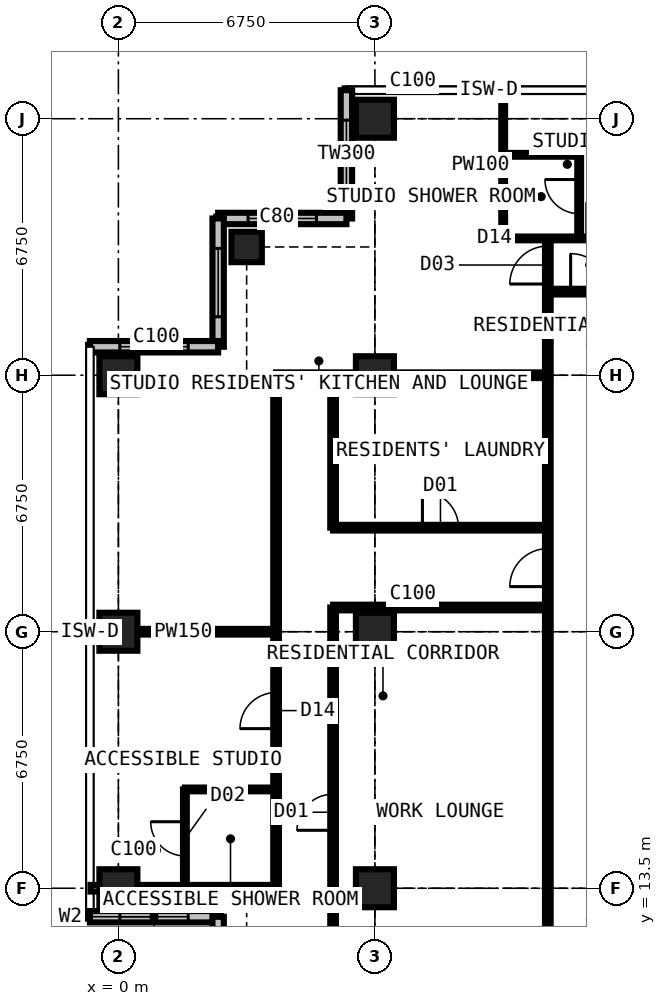
"""IFC4 building model, lengths in metres.
Left out: names, types, materials, properties, quantities, classifications, styles, units other than length and angle.
Written with IfcOpenShell. Run it as: python <this file> out.ifc"""

import sys

from ifc_helpers import new_model, si_unit, direction, frame, frame_2d, origin, origin_2d, place, context, subcontext, project, spatial, rectangle, extrude, element, fill, save


model = new_model("IFC4")
c1 = context("Model", 3, precision=1e-05, world=origin(), true_north=direction((0.0, 1.0)))
c2 = subcontext(c1, "Body", "Model", "MODEL_VIEW")
j1 = project(units=[si_unit("LENGTHUNIT", "METRE"), si_unit("PLANEANGLEUNIT", "RADIAN")], contexts=[c1])
p1 = place(None, origin())
s1 = spatial("IfcSite", under=j1, at=p1, CompositionType="ELEMENT")
p2 = place(p1, origin())
s2 = spatial("IfcBuilding", under=s1, at=p2, CompositionType="ELEMENT")
p3 = place(p2, frame((0.0, 0.0, 233.1)))
s3 = spatial("IfcBuildingStorey", under=s2, at=p3, CompositionType="ELEMENT", Elevation=233.1)
for number, where, z_axis, x_axis in (
    (1, (0.0, 13.5, 0.0), (0.0, 0.0, 1.0), (1.0, 0.0, 0.0)),
    (2, (0.0, 20.25, 0.0), (0.0, 0.0, 1.0), (1.0, 0.0, 0.0)),
    (3, (0.0, 27.0, 0.0), (0.0, 0.0, 1.0), (1.0, 0.0, 0.0)),
):
    element("IfcColumn", number, at=place(p3, frame(where, z_axis=z_axis, x_axis=x_axis)), inside=s3, PredefinedType="COLUMN", context=c2, shape_type="SweptSolid", body=[
        extrude(rectangle(XDim=1.0, YDim=1.0, at=origin_2d()), origin(), (0.0, 0.0, 1.0), 3.6),
    ])
p4 = place(p3, frame((3.375, 30.375, 0.0), z_axis=(0.0, 0.0, 1.0), x_axis=(1.0, 0.0, 0.0)))
e4 = element("IfcColumn", 4, at=p4, inside=s3, PredefinedType="COLUMN", context=c2, shape_type="SweptSolid", body=[
    extrude(rectangle(XDim=0.8, YDim=0.8, at=origin_2d()), origin(), (0.0, 0.0, 1.0), 3.6),
])
for number, where, z_axis, x_axis in (
    (5, (6.75, 13.5, 0.0), (0.0, 0.0, 1.0), (1.0, 0.0, 0.0)),
    (6, (6.75, 20.25, 0.0), (0.0, 0.0, 1.0), (1.0, 0.0, 0.0)),
    (7, (6.75, 27.0, 0.0), (0.0, 0.0, 1.0), (1.0, 0.0, 0.0)),
    (8, (6.75, 33.75, 0.0), (0.0, 0.0, 1.0), (1.0, 0.0, 0.0)),
):
    element("IfcColumn", number, at=place(p3, frame(where, z_axis=z_axis, x_axis=x_axis)), inside=s3, PredefinedType="COLUMN", context=c2, shape_type="SweptSolid", body=[
        extrude(rectangle(XDim=1.0, YDim=1.0, at=origin_2d()), origin(), (0.0, 0.0, 1.0), 3.6),
    ])
p5 = place(p3, frame((6.0, 34.5, 0.0), z_axis=(0.0, 0.0, 1.0), x_axis=(0.0, -1.0, 0.0)))
e9 = element("IfcWall", 9, at=p5, inside=s3, PredefinedType="SOLIDWALL", context=c2, shape_type="SweptSolid", body=[
    extrude(rectangle(XDim=3.375, YDim=0.3, at=frame_2d((1.688, 0.0))), origin(), (0.0, 0.0, 1.0), 3.375),
])
p6 = place(p5, frame((0.788, 0.0, 0.6)))
e10 = element("IfcOpeningElement", 10, at=p6, cuts=e9, PredefinedType="OPENING", context=c2, shape_type="SweptSolid", body=[
    extrude(rectangle(XDim=1.8, YDim=2.1, at=frame_2d((0.9, 1.05))), frame((0.0, 0.16, 0.0), z_axis=(0.0, -1.0, 0.0), x_axis=(1.0, 0.0, 0.0)), (0.0, 0.0, 1.0), 0.32),
])
p7 = place(p3, frame((6.0, 31.125, 0.0), z_axis=(0.0, 0.0, 1.0), x_axis=(-1.0, 0.0, 0.0)))
e11 = element("IfcWall", 11, at=p7, inside=s3, PredefinedType="SOLIDWALL", context=c2, shape_type="SweptSolid", body=[
    extrude(rectangle(XDim=3.375, YDim=0.3, at=frame_2d((1.688, 0.0))), origin(), (0.0, 0.0, 1.0), 3.375),
])
p8 = place(p7, frame((0.788, 0.0, 0.6)))
e12 = element("IfcOpeningElement", 12, at=p8, cuts=e11, PredefinedType="OPENING", context=c2, shape_type="SweptSolid", body=[
    extrude(rectangle(XDim=1.8, YDim=2.1, at=frame_2d((0.9, 1.05))), frame((0.0, 0.16, 0.0), z_axis=(0.0, -1.0, 0.0), x_axis=(1.0, 0.0, 0.0)), (0.0, 0.0, 1.0), 0.32),
])
p9 = place(p3, frame((2.625, 31.125, 0.0), z_axis=(0.0, 0.0, 1.0), x_axis=(0.0, -1.0, 0.0)))
e13 = element("IfcWall", 13, at=p9, inside=s3, PredefinedType="SOLIDWALL", context=c2, shape_type="SweptSolid", body=[
    extrude(rectangle(XDim=3.375, YDim=0.3, at=frame_2d((1.688, 0.0))), origin(), (0.0, 0.0, 1.0), 3.375),
])
p10 = place(p9, frame((0.788, 0.0, 0.6)))
e14 = element("IfcOpeningElement", 14, at=p10, cuts=e13, PredefinedType="OPENING", context=c2, shape_type="SweptSolid", body=[
    extrude(rectangle(XDim=1.8, YDim=2.1, at=frame_2d((0.9, 1.05))), frame((0.0, 0.16, 0.0), z_axis=(0.0, -1.0, 0.0), x_axis=(1.0, 0.0, 0.0)), (0.0, 0.0, 1.0), 0.32),
])
p11 = place(p3, frame((2.625, 27.75, 0.0), z_axis=(0.0, 0.0, 1.0), x_axis=(-1.0, 0.0, 0.0)))
e15 = element("IfcWall", 15, at=p11, inside=s3, PredefinedType="SOLIDWALL", context=c2, shape_type="SweptSolid", body=[
    extrude(rectangle(XDim=3.375, YDim=0.3, at=frame_2d((1.688, 0.0))), origin(), (0.0, 0.0, 1.0), 3.375),
])
p12 = place(p11, frame((0.788, 0.0, 0.6)))
e16 = element("IfcOpeningElement", 16, at=p12, cuts=e15, PredefinedType="OPENING", context=c2, shape_type="SweptSolid", body=[
    extrude(rectangle(XDim=1.8, YDim=2.1, at=frame_2d((0.9, 1.05))), frame((0.0, 0.16, 0.0), z_axis=(0.0, -1.0, 0.0), x_axis=(1.0, 0.0, 0.0)), (0.0, 0.0, 1.0), 0.32),
])
p13 = place(p3, frame((-0.75, 12.75, 0.0), z_axis=(0.0, 0.0, 1.0), x_axis=(1.0, 0.0, 0.0)))
e17 = element("IfcWall", 17, at=p13, inside=s3, PredefinedType="SOLIDWALL", context=c2, shape_type="SweptSolid", body=[
    extrude(rectangle(XDim=3.375, YDim=0.3, at=frame_2d((1.688, 0.0))), origin(), (0.0, 0.0, 1.0), 3.375),
])
p14 = place(p13, frame((0.788, 0.0, 0.6)))
e18 = element("IfcOpeningElement", 18, at=p14, cuts=e17, PredefinedType="OPENING", context=c2, shape_type="SweptSolid", body=[
    extrude(rectangle(XDim=1.8, YDim=2.1, at=frame_2d((0.9, 1.05))), frame((0.0, 0.16, 0.0), z_axis=(0.0, -1.0, 0.0), x_axis=(1.0, 0.0, 0.0)), (0.0, 0.0, 1.0), 0.32),
])
p15 = place(p3, frame((2.625, 12.75, 0.0), z_axis=(0.0, 0.0, 1.0), x_axis=(0.0, -1.0, 0.0)))
e19 = element("IfcWall", 19, at=p15, inside=s3, PredefinedType="SOLIDWALL", context=c2, shape_type="SweptSolid", body=[
    extrude(rectangle(XDim=3.375, YDim=0.3, at=frame_2d((1.688, 0.0))), origin(), (0.0, 0.0, 1.0), 3.375),
])
p16 = place(p15, frame((0.788, 0.0, 0.6)))
e20 = element("IfcOpeningElement", 20, at=p16, cuts=e19, PredefinedType="OPENING", context=c2, shape_type="SweptSolid", body=[
    extrude(rectangle(XDim=1.8, YDim=2.1, at=frame_2d((0.9, 1.05))), frame((0.0, 0.16, 0.0), z_axis=(0.0, -1.0, 0.0), x_axis=(1.0, 0.0, 0.0)), (0.0, 0.0, 1.0), 0.32),
])
p17 = place(p3, frame((-0.734, 13.5, 0.0), z_axis=(0.0, 0.0, 1.0), x_axis=(1.0, 0.0, 0.0)))
e21 = element("IfcWall", 21, at=p17, inside=s3, PredefinedType="PARTITIONING", context=c2, shape_type="SweptSolid", body=[
    extrude(rectangle(XDim=4.884, YDim=0.175, at=frame_2d((2.442, 0.0))), origin(), (0.0, 0.0, 1.0), 2.877),
])
p18 = place(p3, frame((-0.734, 20.25, 0.0), z_axis=(0.0, 0.0, 1.0), x_axis=(1.0, 0.0, 0.0)))
e22 = element("IfcWall", 22, at=p18, inside=s3, PredefinedType="PARTITIONING", context=c2, shape_type="SweptSolid", body=[
    extrude(rectangle(XDim=4.884, YDim=0.15, at=frame_2d((2.442, 0.0))), origin(), (0.0, 0.0, 1.0), 2.877),
])
p19 = place(p3, frame((1.75, 13.5, 0.0), z_axis=(0.0, 0.0, 1.0), x_axis=(0.0, 1.0, 0.0)))
e23 = element("IfcWall", 23, at=p19, inside=s3, PredefinedType="PARTITIONING", context=c2, shape_type="SweptSolid", body=[
    extrude(rectangle(XDim=2.6, YDim=0.1, at=frame_2d((1.3, 0.0))), origin(), (0.0, 0.0, 1.0), 3.375),
])
p20 = place(p19, frame((0.85, 0.0, 0.0)))
e24 = element("IfcOpeningElement", 24, at=p20, cuts=e23, PredefinedType="OPENING", context=c2, shape_type="SweptSolid", body=[
    extrude(rectangle(XDim=0.9, YDim=2.2, at=frame_2d((0.45, 1.1))), frame((0.0, 0.06, 0.0), z_axis=(0.0, -1.0, 0.0), x_axis=(1.0, 0.0, 0.0)), (0.0, 0.0, 1.0), 0.12),
])
p21 = place(p3, frame((1.75, 16.1, 0.0), z_axis=(0.0, 0.0, 1.0), x_axis=(1.0, 0.0, 0.0)))
e25 = element("IfcWall", 25, at=p21, inside=s3, PredefinedType="PARTITIONING", context=c2, shape_type="SweptSolid", body=[
    extrude(rectangle(XDim=2.4, YDim=0.1, at=frame_2d((1.2, 0.0))), origin(), (0.0, 0.0, 1.0), 3.375),
])
p22 = place(p3, frame((2.625, 12.766, 0.0), z_axis=(0.0, 0.0, 1.0), x_axis=(0.0, 1.0, 0.0)))
e26 = element("IfcWall", 26, at=p22, inside=s3, PredefinedType="PARTITIONING", context=c2, shape_type="SweptSolid", body=[
    extrude(rectangle(XDim=0.734, YDim=0.15, at=frame_2d((0.367, 0.0))), origin(), (0.0, 0.0, 1.0), 3.375),
])
p23 = place(p3, frame((4.15, 13.5, 0.0), z_axis=(0.0, 0.0, 1.0), x_axis=(0.0, 1.0, 0.0)))
e27 = element("IfcWall", 27, at=p23, inside=s3, PredefinedType="PARTITIONING", context=c2, shape_type="SweptSolid", body=[
    extrude(rectangle(XDim=13.5, YDim=0.15, at=frame_2d((6.75, 0.0))), origin(), (0.0, 0.0, 1.0), 3.375),
])
p24 = place(p23, frame((4.2, 0.0, 0.0)))
e28 = element("IfcOpeningElement", 28, at=p24, cuts=e27, PredefinedType="OPENING", context=c2, shape_type="SweptSolid", body=[
    extrude(rectangle(XDim=0.95, YDim=2.2, at=frame_2d((0.475, 1.1))), frame((0.0, 0.085, 0.0), z_axis=(0.0, -1.0, 0.0), x_axis=(1.0, 0.0, 0.0)), (0.0, 0.0, 1.0), 0.17),
])
p25 = place(p3, frame((4.15, 27.0, 0.0), z_axis=(0.0, 0.0, 1.0), x_axis=(1.0, 0.0, 0.0)))
e29 = element("IfcWall", 29, at=p25, inside=s3, PredefinedType="PARTITIONING", context=c2, shape_type="SweptSolid", body=[
    extrude(rectangle(XDim=7.15, YDim=0.15, at=frame_2d((3.575, 0.0))), origin(), (0.0, 0.0, 1.0), 2.877),
])
p26 = place(p3, frame((5.65, 10.125, 0.0), z_axis=(0.0, 0.0, 1.0), x_axis=(0.0, 1.0, 0.0)))
e30 = element("IfcWall", 30, at=p26, inside=s3, PredefinedType="PARTITIONING", context=c2, shape_type="SweptSolid", body=[
    extrude(rectangle(XDim=10.762, YDim=0.15, at=frame_2d((5.381, 0.0))), origin(), (0.0, 0.0, 1.0), 3.375),
])
p27 = place(p26, frame((4.9, 0.0, 0.0)))
e31 = element("IfcOpeningElement", 31, at=p27, cuts=e30, PredefinedType="OPENING", context=c2, shape_type="SweptSolid", body=[
    extrude(rectangle(XDim=0.95, YDim=2.2, at=frame_2d((0.475, 1.1))), frame((0.0, 0.085, 0.0), z_axis=(0.0, -1.0, 0.0), x_axis=(1.0, 0.0, 0.0)), (0.0, 0.0, 1.0), 0.17),
])
p28 = place(p3, frame((5.65, 20.887, 0.0), z_axis=(0.0, 0.0, 1.0), x_axis=(1.0, 0.0, 0.0)))
e32 = element("IfcWall", 32, at=p28, inside=s3, PredefinedType="PARTITIONING", context=c2, shape_type="SweptSolid", body=[
    extrude(rectangle(XDim=5.65, YDim=0.15, at=frame_2d((2.825, 0.0))), origin(), (0.0, 0.0, 1.0), 3.375),
])
p29 = place(p3, frame((5.65, 22.988, 0.0), z_axis=(0.0, 0.0, 1.0), x_axis=(0.0, 1.0, 0.0)))
e33 = element("IfcWall", 33, at=p29, inside=s3, PredefinedType="PARTITIONING", context=c2, shape_type="SweptSolid", body=[
    extrude(rectangle(XDim=4.012, YDim=0.15, at=frame_2d((2.006, 0.0))), origin(), (0.0, 0.0, 1.0), 3.375),
])
p30 = place(p3, frame((5.65, 22.988, 0.0), z_axis=(0.0, 0.0, 1.0), x_axis=(1.0, 0.0, 0.0)))
e34 = element("IfcWall", 34, at=p30, inside=s3, PredefinedType="PARTITIONING", context=c2, shape_type="SweptSolid", body=[
    extrude(rectangle(XDim=5.65, YDim=0.15, at=frame_2d((2.825, 0.0))), origin(), (0.0, 0.0, 1.0), 3.375),
])
p31 = place(p30, frame((2.35, 0.0, 0.0)))
e35 = element("IfcOpeningElement", 35, at=p31, cuts=e34, PredefinedType="OPENING", context=c2, shape_type="SweptSolid", body=[
    extrude(rectangle(XDim=0.95, YDim=2.2, at=frame_2d((0.475, 1.1))), frame((0.0, 0.085, 0.0), z_axis=(0.0, -1.0, 0.0), x_axis=(1.0, 0.0, 0.0)), (0.0, 0.0, 1.0), 0.17),
])
p32 = place(p3, frame((10.125, 30.6, 0.0), z_axis=(0.0, 0.0, 1.0), x_axis=(0.0, 1.0, 0.0)))
e36 = element("IfcWall", 36, at=p32, inside=s3, PredefinedType="PARTITIONING", context=c2, shape_type="SweptSolid", body=[
    extrude(rectangle(XDim=3.884, YDim=0.1, at=frame_2d((1.942, 0.0))), origin(), (0.0, 0.0, 1.0), 3.375),
])
p33 = place(p3, frame((10.125, 30.6, 0.0), z_axis=(0.0, 0.0, 1.0), x_axis=(1.0, 0.0, 0.0)))
e37 = element("IfcWall", 37, at=p33, inside=s3, PredefinedType="PARTITIONING", context=c2, shape_type="SweptSolid", body=[
    extrude(rectangle(XDim=3.375, YDim=0.1, at=frame_2d((1.688, 0.0))), origin(), (0.0, 0.0, 1.0), 3.375),
])
p34 = place(p33, frame((2.2, 0.0, 0.0)))
e38 = element("IfcOpeningElement", 38, at=p34, cuts=e37, PredefinedType="OPENING", context=c2, shape_type="SweptSolid", body=[
    extrude(rectangle(XDim=0.95, YDim=2.2, at=frame_2d((0.475, 1.1))), frame((0.0, 0.06, 0.0), z_axis=(0.0, -1.0, 0.0), x_axis=(1.0, 0.0, 0.0)), (0.0, 0.0, 1.0), 0.12),
])
p35 = place(p3, frame((10.125, 32.8, 0.0), z_axis=(0.0, 0.0, 1.0), x_axis=(1.0, 0.0, 0.0)))
e39 = element("IfcWall", 39, at=p35, inside=s3, PredefinedType="PARTITIONING", context=c2, shape_type="SweptSolid", body=[
    extrude(rectangle(XDim=2.0, YDim=0.1, at=frame_2d((1.0, 0.0))), origin(), (0.0, 0.0, 1.0), 3.375),
])
p36 = place(p3, frame((11.3, 11.3, 0.0), z_axis=(0.0, 0.0, 1.0), x_axis=(0.0, 1.0, 0.0)))
e40 = element("IfcWall", 40, at=p36, inside=s3, PredefinedType="PARTITIONING", context=c2, shape_type="SweptSolid", body=[
    extrude(rectangle(XDim=19.3, YDim=0.15, at=frame_2d((9.65, 0.0))), origin(), (0.0, 0.0, 1.0), 3.375),
])
p37 = place(p36, frame((18.1, 0.0, 0.0)))
e41 = element("IfcOpeningElement", 41, at=p37, cuts=e40, PredefinedType="OPENING", context=c2, shape_type="SweptSolid", body=[
    extrude(rectangle(XDim=1.0, YDim=2.2, at=frame_2d((0.5, 1.1))), frame((0.0, 0.085, 0.0), z_axis=(0.0, -1.0, 0.0), x_axis=(1.0, 0.0, 0.0)), (0.0, 0.0, 1.0), 0.17),
])
p38 = place(p36, frame((10.137, 0.0, 0.0)))
e42 = element("IfcOpeningElement", 42, at=p38, cuts=e40, PredefinedType="OPENING", context=c2, shape_type="SweptSolid", body=[
    extrude(rectangle(XDim=1.0, YDim=2.2, at=frame_2d((0.5, 1.1))), frame((0.0, 0.085, 0.0), z_axis=(0.0, -1.0, 0.0), x_axis=(1.0, 0.0, 0.0)), (0.0, 0.0, 1.0), 0.17),
])
p39 = place(p3, frame((11.3, 29.2, 0.0), z_axis=(0.0, 0.0, 1.0), x_axis=(1.0, 0.0, 0.0)))
e43 = element("IfcWall", 43, at=p39, inside=s3, PredefinedType="PARTITIONING", context=c2, shape_type="SweptSolid", body=[
    extrude(rectangle(XDim=19.809, YDim=0.15, at=frame_2d((9.904, 0.0))), origin(), (0.0, 0.0, 1.0), 3.375),
])
p40 = place(p39, frame((16.3, 0.0, 0.0)))
e44 = element("IfcOpeningElement", 44, at=p40, cuts=e43, PredefinedType="OPENING", context=c2, shape_type="SweptSolid", body=[
    extrude(rectangle(XDim=1.0, YDim=2.2, at=frame_2d((0.5, 1.1))), frame((0.0, 0.085, 0.0), z_axis=(0.0, -1.0, 0.0), x_axis=(1.0, 0.0, 0.0)), (0.0, 0.0, 1.0), 0.17),
])
p41 = place(p39, frame((5.825, 0.0, 0.0)))
e45 = element("IfcOpeningElement", 45, at=p41, cuts=e43, PredefinedType="OPENING", context=c2, shape_type="SweptSolid", body=[
    extrude(rectangle(XDim=0.95, YDim=2.2, at=frame_2d((0.475, 1.1))), frame((0.0, 0.085, 0.0), z_axis=(0.0, -1.0, 0.0), x_axis=(1.0, 0.0, 0.0)), (0.0, 0.0, 1.0), 0.17),
])
p42 = place(p39, frame((9.2, 0.0, 0.0)))
e46 = element("IfcOpeningElement", 46, at=p42, cuts=e43, PredefinedType="OPENING", context=c2, shape_type="SweptSolid", body=[
    extrude(rectangle(XDim=0.95, YDim=2.2, at=frame_2d((0.475, 1.1))), frame((0.0, 0.085, 0.0), z_axis=(0.0, -1.0, 0.0), x_axis=(1.0, 0.0, 0.0)), (0.0, 0.0, 1.0), 0.17),
])
p43 = place(p39, frame((12.575, 0.0, 0.0)))
e47 = element("IfcOpeningElement", 47, at=p43, cuts=e43, PredefinedType="OPENING", context=c2, shape_type="SweptSolid", body=[
    extrude(rectangle(XDim=0.95, YDim=2.2, at=frame_2d((0.475, 1.1))), frame((0.0, 0.085, 0.0), z_axis=(0.0, -1.0, 0.0), x_axis=(1.0, 0.0, 0.0)), (0.0, 0.0, 1.0), 0.17),
])
p44 = place(p39, frame((0.6, 0.0, 0.0)))
e48 = element("IfcOpeningElement", 48, at=p44, cuts=e43, PredefinedType="OPENING", context=c2, shape_type="SweptSolid", body=[
    extrude(rectangle(XDim=1.0, YDim=2.2, at=frame_2d((0.5, 1.1))), frame((0.0, 0.085, 0.0), z_axis=(0.0, -1.0, 0.0), x_axis=(1.0, 0.0, 0.0)), (0.0, 0.0, 1.0), 0.17),
])
p45 = place(p3, frame((12.125, 30.6, 0.0), z_axis=(0.0, 0.0, 1.0), x_axis=(0.0, 1.0, 0.0)))
e49 = element("IfcWall", 49, at=p45, inside=s3, PredefinedType="PARTITIONING", context=c2, shape_type="SweptSolid", body=[
    extrude(rectangle(XDim=2.2, YDim=0.1, at=frame_2d((1.1, 0.0))), origin(), (0.0, 0.0, 1.0), 3.375),
])
p46 = place(p45, frame((0.65, 0.0, 0.0)))
e50 = element("IfcOpeningElement", 50, at=p46, cuts=e49, PredefinedType="OPENING", context=c2, shape_type="SweptSolid", body=[
    extrude(rectangle(XDim=0.9, YDim=2.2, at=frame_2d((0.45, 1.1))), frame((0.0, 0.06, 0.0), z_axis=(0.0, -1.0, 0.0), x_axis=(1.0, 0.0, 0.0)), (0.0, 0.0, 1.0), 0.12),
])
p47 = place(p6, origin())
e51 = element("IfcWindow", 51, at=p47, inside=s3, PartitioningType="SINGLE_PANEL", PredefinedType="WINDOW", context=c2, shape_type="SweptSolid", body=[
    extrude(rectangle(XDim=1.8, YDim=2.1, at=frame_2d((0.9, 1.05))), frame((0.0, 0.03, 0.0), z_axis=(0.0, -1.0, 0.0), x_axis=(1.0, 0.0, 0.0)), (0.0, 0.0, 1.0), 0.06),
])
fill(e10, e51)
p48 = place(p8, origin())
e52 = element("IfcWindow", 52, at=p48, inside=s3, PartitioningType="SINGLE_PANEL", PredefinedType="WINDOW", context=c2, shape_type="SweptSolid", body=[
    extrude(rectangle(XDim=1.8, YDim=2.1, at=frame_2d((0.9, 1.05))), frame((0.0, 0.03, 0.0), z_axis=(0.0, -1.0, 0.0), x_axis=(1.0, 0.0, 0.0)), (0.0, 0.0, 1.0), 0.06),
])
fill(e12, e52)
p49 = place(p10, origin())
e53 = element("IfcWindow", 53, at=p49, inside=s3, PartitioningType="SINGLE_PANEL", PredefinedType="WINDOW", context=c2, shape_type="SweptSolid", body=[
    extrude(rectangle(XDim=1.8, YDim=2.1, at=frame_2d((0.9, 1.05))), frame((0.0, 0.03, 0.0), z_axis=(0.0, -1.0, 0.0), x_axis=(1.0, 0.0, 0.0)), (0.0, 0.0, 1.0), 0.06),
])
fill(e14, e53)
p50 = place(p12, origin())
e54 = element("IfcWindow", 54, at=p50, inside=s3, PartitioningType="SINGLE_PANEL", PredefinedType="WINDOW", context=c2, shape_type="SweptSolid", body=[
    extrude(rectangle(XDim=1.8, YDim=2.1, at=frame_2d((0.9, 1.05))), frame((0.0, 0.03, 0.0), z_axis=(0.0, -1.0, 0.0), x_axis=(1.0, 0.0, 0.0)), (0.0, 0.0, 1.0), 0.06),
])
fill(e16, e54)
p51 = place(p14, origin())
e55 = element("IfcWindow", 55, at=p51, inside=s3, PartitioningType="SINGLE_PANEL", PredefinedType="WINDOW", context=c2, shape_type="SweptSolid", body=[
    extrude(rectangle(XDim=1.8, YDim=2.1, at=frame_2d((0.9, 1.05))), frame((0.0, 0.03, 0.0), z_axis=(0.0, -1.0, 0.0), x_axis=(1.0, 0.0, 0.0)), (0.0, 0.0, 1.0), 0.06),
])
fill(e18, e55)
p52 = place(p46, origin())
e56 = element("IfcDoor", 56, at=p52, inside=s3, OperationType="SINGLE_SWING_RIGHT", PredefinedType="DOOR", context=c2, shape_type="SweptSolid", body=[
    extrude(rectangle(XDim=0.9, YDim=2.2, at=frame_2d((0.45, 1.1))), frame((0.0, 0.025, 0.0), z_axis=(0.0, -1.0, 0.0), x_axis=(1.0, 0.0, 0.0)), (0.0, 0.0, 1.0), 0.05),
])
fill(e50, e56)
p53 = place(p44, origin())
e57 = element("IfcDoor", 57, at=p53, inside=s3, OperationType="SINGLE_SWING_LEFT", PredefinedType="DOOR", context=c2, shape_type="SweptSolid", body=[
    extrude(rectangle(XDim=1.0, YDim=2.2, at=frame_2d((0.5, 1.1))), frame((0.0, 0.025, 0.0), z_axis=(0.0, -1.0, 0.0), x_axis=(1.0, 0.0, 0.0)), (0.0, 0.0, 1.0), 0.05),
])
fill(e48, e57)
p54 = place(p37, origin())
e58 = element("IfcDoor", 58, at=p54, inside=s3, OperationType="SINGLE_SWING_LEFT", PredefinedType="DOOR", context=c2, shape_type="SweptSolid", body=[
    extrude(rectangle(XDim=1.0, YDim=2.2, at=frame_2d((0.5, 1.1))), frame((0.0, 0.025, 0.0), z_axis=(0.0, -1.0, 0.0), x_axis=(1.0, 0.0, 0.0)), (0.0, 0.0, 1.0), 0.05),
])
fill(e41, e58)
p55 = place(p24, origin())
e59 = element("IfcDoor", 59, at=p55, inside=s3, OperationType="SINGLE_SWING_LEFT", PredefinedType="DOOR", context=c2, shape_type="SweptSolid", body=[
    extrude(rectangle(XDim=0.95, YDim=2.2, at=frame_2d((0.475, 1.1))), frame((0.0, 0.025, 0.0), z_axis=(0.0, -1.0, 0.0), x_axis=(1.0, 0.0, 0.0)), (0.0, 0.0, 1.0), 0.05),
])
fill(e28, e59)
p56 = place(p20, origin())
e60 = element("IfcDoor", 60, at=p56, inside=s3, OperationType="SINGLE_SWING_RIGHT", PredefinedType="DOOR", context=c2, shape_type="SweptSolid", body=[
    extrude(rectangle(XDim=0.9, YDim=2.2, at=frame_2d((0.45, 1.1))), frame((0.0, 0.025, 0.0), z_axis=(0.0, -1.0, 0.0), x_axis=(1.0, 0.0, 0.0)), (0.0, 0.0, 1.0), 0.05),
])
fill(e24, e60)
p57 = place(p38, origin())
e61 = element("IfcDoor", 61, at=p57, inside=s3, OperationType="SINGLE_SWING_LEFT", PredefinedType="DOOR", context=c2, shape_type="SweptSolid", body=[
    extrude(rectangle(XDim=1.0, YDim=2.2, at=frame_2d((0.5, 1.1))), frame((0.0, 0.025, 0.0), z_axis=(0.0, -1.0, 0.0), x_axis=(1.0, 0.0, 0.0)), (0.0, 0.0, 1.0), 0.05),
])
fill(e42, e61)
p58 = place(p31, origin())
e62 = element("IfcDoor", 62, at=p58, inside=s3, OperationType="SINGLE_SWING_LEFT", PredefinedType="DOOR", context=c2, shape_type="SweptSolid", body=[
    extrude(rectangle(XDim=0.95, YDim=2.2, at=frame_2d((0.475, 1.1))), frame((0.0, 0.025, 0.0), z_axis=(0.0, -1.0, 0.0), x_axis=(1.0, 0.0, 0.0)), (0.0, 0.0, 1.0), 0.05),
])
fill(e35, e62)
p59 = place(p27, origin())
e63 = element("IfcDoor", 63, at=p59, inside=s3, OperationType="SINGLE_SWING_LEFT", PredefinedType="DOOR", context=c2, shape_type="SweptSolid", body=[
    extrude(rectangle(XDim=0.95, YDim=2.2, at=frame_2d((0.475, 1.1))), frame((0.0, 0.025, 0.0), z_axis=(0.0, -1.0, 0.0), x_axis=(1.0, 0.0, 0.0)), (0.0, 0.0, 1.0), 0.05),
])
fill(e31, e63)
save(model, sys.argv[1])
